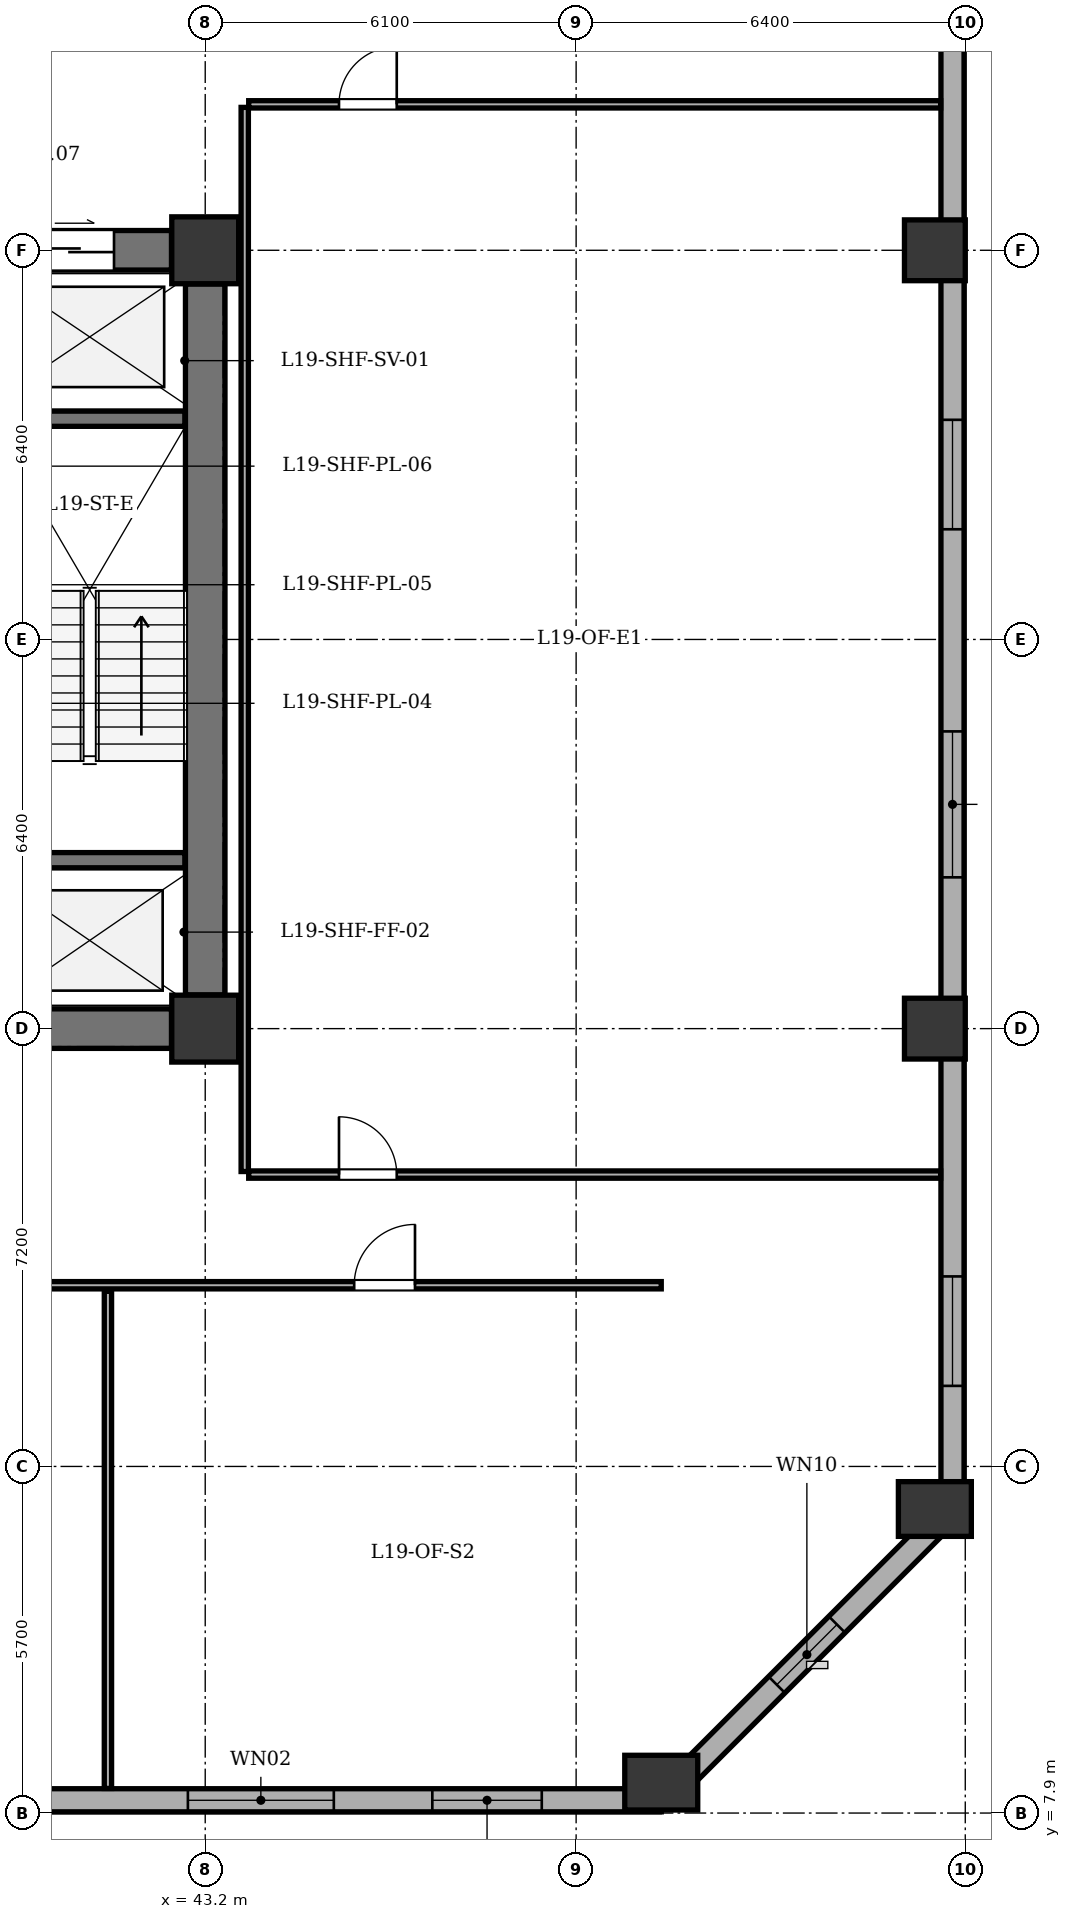
"""IFC4 building model, lengths in metres.
Left out: names, types, materials, properties, quantities, classifications, styles, units other than length and angle.
Written with IfcOpenShell. Run it as: python <this file> out.ifc"""

import sys

from ifc_helpers import new_model, si_unit, direction, frame, frame_2d, origin, origin_2d, place, context, subcontext, project, spatial, rectangle, extrude, element, fill, save


model = new_model("IFC4")
c1 = context("Model", 3, precision=1e-05, world=origin(), true_north=direction((0.0, 1.0)))
c2 = subcontext(c1, "Body", "Model", "MODEL_VIEW")
j1 = project(units=[si_unit("LENGTHUNIT", "METRE"), si_unit("PLANEANGLEUNIT", "RADIAN")], contexts=[c1])
p1 = place(None, origin())
s1 = spatial("IfcSite", under=j1, at=p1, CompositionType="ELEMENT")
p2 = place(p1, origin())
s2 = spatial("IfcBuilding", under=s1, at=p2, CompositionType="ELEMENT")
p3 = place(p2, frame((0.0, 0.0, 78.9)))
s3 = spatial("IfcBuildingStorey", under=s2, at=p3, CompositionType="ELEMENT", Elevation=78.9)
for number, where, z_axis, x_axis in (
    (1, (43.2, 20.8, 0.0), (0.0, 0.0, 1.0), (1.0, 0.0, 0.0)),
    (2, (43.2, 33.6, 0.0), (0.0, 0.0, 1.0), (1.0, 0.0, 0.0)),
):
    element("IfcColumn", number, at=place(p3, frame(where, z_axis=z_axis, x_axis=x_axis)), inside=s3, PredefinedType="COLUMN", context=c2, shape_type="SweptSolid", body=[
        extrude(rectangle(XDim=1.1, YDim=1.1, at=origin_2d()), origin(), (0.0, 0.0, 1.0), 3.9),
    ])
for number, where, z_axis, x_axis in (
    (3, (50.7, 8.4, 0.0), (0.0, 0.0, 1.0), (1.0, 0.0, 0.0)),
    (4, (55.2, 12.9, 0.0), (0.0, 0.0, 1.0), (1.0, 0.0, 0.0)),
):
    element("IfcColumn", number, at=place(p3, frame(where, z_axis=z_axis, x_axis=x_axis)), inside=s3, PredefinedType="COLUMN", context=c2, shape_type="SweptSolid", body=[
        extrude(rectangle(XDim=0.9, YDim=1.2, at=origin_2d()), origin(), (0.0, 0.0, 1.0), 3.9),
    ])
for number, where, z_axis, x_axis in (
    (5, (55.2, 20.8, 0.0), (0.0, 0.0, 1.0), (1.0, 0.0, 0.0)),
    (6, (55.2, 33.6, 0.0), (0.0, 0.0, 1.0), (1.0, 0.0, 0.0)),
):
    element("IfcColumn", number, at=place(p3, frame(where, z_axis=z_axis, x_axis=x_axis)), inside=s3, PredefinedType="COLUMN", context=c2, shape_type="SweptSolid", body=[
        extrude(rectangle(XDim=1.0, YDim=1.0, at=origin_2d()), origin(), (0.0, 0.0, 1.0), 3.9),
    ])
p4 = place(p3, frame((50.7, 8.11, 0.0), z_axis=(0.0, 0.0, 1.0), x_axis=(-1.0, 0.0, 0.0)))
e7 = element("IfcWall", 7, at=p4, inside=s3, PredefinedType="STANDARD", context=c2, shape_type="SweptSolid", body=[
    extrude(rectangle(XDim=35.0, YDim=0.38, at=frame_2d((17.5, 0.0))), origin(), (0.0, 0.0, 1.0), 3.135),
])
p5 = place(p4, frame((26.0, 0.0, 0.0)))
e8 = element("IfcOpeningElement", 8, at=p5, cuts=e7, PredefinedType="OPENING", context=c2, shape_type="SweptSolid", body=[
    extrude(rectangle(XDim=1.0, YDim=2.02, at=frame_2d((0.5, 1.01))), frame((0.0, 0.2, 0.0), z_axis=(0.0, -1.0, 0.0), x_axis=(1.0, 0.0, 0.0)), (0.0, 0.0, 1.0), 0.4),
])
p6 = place(p4, frame((1.965, 0.0, 0.8)))
e9 = element("IfcOpeningElement", 9, at=p6, cuts=e7, PredefinedType="OPENING", context=c2, shape_type="SweptSolid", body=[
    extrude(rectangle(XDim=1.8, YDim=1.9, at=frame_2d((0.9, 0.95))), frame((0.0, 0.2, 0.0), z_axis=(0.0, -1.0, 0.0), x_axis=(1.0, 0.0, 0.0)), (0.0, 0.0, 1.0), 0.4),
])
p7 = place(p4, frame((5.385, 0.0, 0.8)))
e10 = element("IfcOpeningElement", 10, at=p7, cuts=e7, PredefinedType="OPENING", context=c2, shape_type="SweptSolid", body=[
    extrude(rectangle(XDim=2.4, YDim=1.9, at=frame_2d((1.2, 0.95))), frame((0.0, 0.2, 0.0), z_axis=(0.0, -1.0, 0.0), x_axis=(1.0, 0.0, 0.0)), (0.0, 0.0, 1.0), 0.4),
])
p8 = place(p4, frame((11.275, 0.0, 0.8)))
e11 = element("IfcOpeningElement", 11, at=p8, cuts=e7, PredefinedType="OPENING", context=c2, shape_type="SweptSolid", body=[
    extrude(rectangle(XDim=1.8, YDim=1.9, at=frame_2d((0.9, 0.95))), frame((0.0, 0.2, 0.0), z_axis=(0.0, -1.0, 0.0), x_axis=(1.0, 0.0, 0.0)), (0.0, 0.0, 1.0), 0.4),
])
p9 = place(p4, frame((16.832, 0.0, 0.8)))
e12 = element("IfcOpeningElement", 12, at=p9, cuts=e7, PredefinedType="OPENING", context=c2, shape_type="SweptSolid", body=[
    extrude(rectangle(XDim=1.8, YDim=1.9, at=frame_2d((0.9, 0.95))), frame((0.0, 0.2, 0.0), z_axis=(0.0, -1.0, 0.0), x_axis=(1.0, 0.0, 0.0)), (0.0, 0.0, 1.0), 0.4),
])
p10 = place(p4, frame((19.568, 0.0, 0.8)))
e13 = element("IfcOpeningElement", 13, at=p10, cuts=e7, PredefinedType="OPENING", context=c2, shape_type="SweptSolid", body=[
    extrude(rectangle(XDim=1.8, YDim=1.9, at=frame_2d((0.9, 0.95))), frame((0.0, 0.2, 0.0), z_axis=(0.0, -1.0, 0.0), x_axis=(1.0, 0.0, 0.0)), (0.0, 0.0, 1.0), 0.4),
])
p11 = place(p4, frame((31.5, 0.0, 0.8)))
e14 = element("IfcOpeningElement", 14, at=p11, cuts=e7, PredefinedType="OPENING", context=c2, shape_type="SweptSolid", body=[
    extrude(rectangle(XDim=1.8, YDim=1.9, at=frame_2d((0.9, 0.95))), frame((0.0, 0.2, 0.0), z_axis=(0.0, -1.0, 0.0), x_axis=(1.0, 0.0, 0.0)), (0.0, 0.0, 1.0), 0.4),
])
p12 = place(p3, frame((55.49, 47.9, 0.0), z_axis=(0.0, 0.0, 1.0), x_axis=(0.0, -1.0, 0.0)))
e15 = element("IfcWall", 15, at=p12, inside=s3, PredefinedType="STANDARD", context=c2, shape_type="SweptSolid", body=[
    extrude(rectangle(XDim=35.0, YDim=0.38, at=frame_2d((17.5, 0.0))), origin(), (0.0, 0.0, 1.0), 3.135),
])
p13 = place(p12, frame((2.693, 0.0, 0.8)))
e16 = element("IfcOpeningElement", 16, at=p13, cuts=e15, PredefinedType="OPENING", context=c2, shape_type="SweptSolid", body=[
    extrude(rectangle(XDim=1.8, YDim=1.9, at=frame_2d((0.9, 0.95))), frame((0.0, 0.2, 0.0), z_axis=(0.0, -1.0, 0.0), x_axis=(1.0, 0.0, 0.0)), (0.0, 0.0, 1.0), 0.4),
])
p14 = place(p12, frame((7.457, 0.0, 0.8)))
e17 = element("IfcOpeningElement", 17, at=p14, cuts=e15, PredefinedType="OPENING", context=c2, shape_type="SweptSolid", body=[
    extrude(rectangle(XDim=2.4, YDim=1.9, at=frame_2d((1.2, 0.95))), frame((0.0, 0.2, 0.0), z_axis=(0.0, -1.0, 0.0), x_axis=(1.0, 0.0, 0.0)), (0.0, 0.0, 1.0), 0.4),
])
p15 = place(p12, frame((17.088, 0.0, 0.8)))
e18 = element("IfcOpeningElement", 18, at=p15, cuts=e15, PredefinedType="OPENING", context=c2, shape_type="SweptSolid", body=[
    extrude(rectangle(XDim=1.8, YDim=1.9, at=frame_2d((0.9, 0.95))), frame((0.0, 0.2, 0.0), z_axis=(0.0, -1.0, 0.0), x_axis=(1.0, 0.0, 0.0)), (0.0, 0.0, 1.0), 0.4),
])
p16 = place(p12, frame((22.212, 0.0, 0.8)))
e19 = element("IfcOpeningElement", 19, at=p16, cuts=e15, PredefinedType="OPENING", context=c2, shape_type="SweptSolid", body=[
    extrude(rectangle(XDim=2.4, YDim=1.9, at=frame_2d((1.2, 0.95))), frame((0.0, 0.2, 0.0), z_axis=(0.0, -1.0, 0.0), x_axis=(1.0, 0.0, 0.0)), (0.0, 0.0, 1.0), 0.4),
])
p17 = place(p12, frame((31.175, 0.0, 0.8)))
e20 = element("IfcOpeningElement", 20, at=p17, cuts=e15, PredefinedType="OPENING", context=c2, shape_type="SweptSolid", body=[
    extrude(rectangle(XDim=1.8, YDim=1.9, at=frame_2d((0.9, 0.95))), frame((0.0, 0.2, 0.0), z_axis=(0.0, -1.0, 0.0), x_axis=(1.0, 0.0, 0.0)), (0.0, 0.0, 1.0), 0.4),
])
p18 = place(p3, frame((55.49, 12.9, 0.0), z_axis=(0.0, 0.0, 1.0), x_axis=(-0.707124801467, -0.707088760447, 0.0)))
e21 = element("IfcWall", 21, at=p18, inside=s3, PredefinedType="STANDARD", context=c2, shape_type="SweptSolid", body=[
    extrude(rectangle(XDim=6.774, YDim=0.38, at=frame_2d((3.387, 0.0))), origin(), (0.0, 0.0, 1.0), 3.135),
])
p19 = place(p18, frame((2.687, 0.0, 0.8)))
e22 = element("IfcOpeningElement", 22, at=p19, cuts=e21, PredefinedType="OPENING", context=c2, shape_type="SweptSolid", body=[
    extrude(rectangle(XDim=1.4, YDim=1.65, at=frame_2d((0.7, 0.825))), frame((0.0, 0.2, 0.0), z_axis=(0.0, -1.0, 0.0), x_axis=(1.0, 0.0, 0.0)), (0.0, 0.0, 1.0), 0.4),
])
p20 = place(p3, frame((43.2, 21.355, 0.0), z_axis=(0.0, 0.0, 1.0), x_axis=(0.0, 1.0, 0.0)))
e23 = element("IfcWall", 23, at=p20, inside=s3, PredefinedType="SHEAR", context=c2, shape_type="SweptSolid", body=[
    extrude(rectangle(XDim=11.69, YDim=0.65, at=frame_2d((5.845, 0.0))), origin(), (0.0, 0.0, 1.0), 3.6),
])
p21 = place(p3, frame((35.755, 20.8, 0.0), z_axis=(0.0, 0.0, 1.0), x_axis=(1.0, 0.0, 0.0)))
e24 = element("IfcWall", 24, at=p21, inside=s3, PredefinedType="SHEAR", context=c2, shape_type="SweptSolid", body=[
    extrude(rectangle(XDim=6.89, YDim=0.65, at=frame_2d((3.445, 0.0))), origin(), (0.0, 0.0, 1.0), 3.6),
])
p22 = place(p3, frame((35.755, 33.6, 0.0), z_axis=(0.0, 0.0, 1.0), x_axis=(1.0, 0.0, 0.0)))
e25 = element("IfcWall", 25, at=p22, inside=s3, PredefinedType="SHEAR", context=c2, shape_type="SweptSolid", body=[
    extrude(rectangle(XDim=6.89, YDim=0.65, at=frame_2d((3.445, 0.0))), origin(), (0.0, 0.0, 1.0), 3.6),
])
p23 = place(p22, frame((4.645, 0.0, 0.0)))
e26 = element("IfcOpeningElement", 26, at=p23, cuts=e25, PredefinedType="OPENING", context=c2, shape_type="SweptSolid", body=[
    extrude(rectangle(XDim=1.3, YDim=2.15, at=frame_2d((0.65, 1.075))), frame((0.0, 0.335, 0.0), z_axis=(0.0, -1.0, 0.0), x_axis=(1.0, 0.0, 0.0)), (0.0, 0.0, 1.0), 0.67),
])
p24 = place(p22, frame((2.445, 0.0, 0.0)))
e27 = element("IfcOpeningElement", 27, at=p24, cuts=e25, PredefinedType="OPENING", context=c2, shape_type="SweptSolid", body=[
    extrude(rectangle(XDim=0.85, YDim=2.02, at=frame_2d((0.425, 1.01))), frame((0.0, 0.335, 0.0), z_axis=(0.0, -1.0, 0.0), x_axis=(1.0, 0.0, 0.0)), (0.0, 0.0, 1.0), 0.67),
])
for number, where, z_axis, x_axis in (
    (28, (39.69, 23.57, 0.0), (0.0, 0.0, 1.0), (1.0, 0.0, 0.0)),
    (29, (39.69, 30.83, 0.0), (0.0, 0.0, 1.0), (1.0, 0.0, 0.0)),
):
    element("IfcWall", number, at=place(p3, frame(where, z_axis=z_axis, x_axis=x_axis)), inside=s3, PredefinedType="SHEAR", context=c2, shape_type="SweptSolid", body=[
        extrude(rectangle(XDim=3.175, YDim=0.25, at=frame_2d((1.587, 0.0))), origin(), (0.0, 0.0, 1.0), 3.6),
    ])
p25 = place(p3, frame((15.7, 16.58, 0.0), z_axis=(0.0, 0.0, 1.0), x_axis=(1.0, 0.0, 0.0)))
e30 = element("IfcWall", 30, at=p25, inside=s3, PredefinedType="PARTITIONING", context=c2, shape_type="SweptSolid", body=[
    extrude(rectangle(XDim=35.0, YDim=0.12, at=frame_2d((17.5, 0.0))), origin(), (0.0, 0.0, 1.0), 3.6),
])
p26 = place(p25, frame((12.45, 0.0, 0.0)))
e31 = element("IfcOpeningElement", 31, at=p26, cuts=e30, PredefinedType="OPENING", context=c2, shape_type="SweptSolid", body=[
    extrude(rectangle(XDim=1.0, YDim=2.1, at=frame_2d((0.5, 1.05))), frame((0.0, 0.07, 0.0), z_axis=(0.0, -1.0, 0.0), x_axis=(1.0, 0.0, 0.0)), (0.0, 0.0, 1.0), 0.14),
])
p27 = place(p25, frame((29.95, 0.0, 0.0)))
e32 = element("IfcOpeningElement", 32, at=p27, cuts=e30, PredefinedType="OPENING", context=c2, shape_type="SweptSolid", body=[
    extrude(rectangle(XDim=1.0, YDim=2.1, at=frame_2d((0.5, 1.05))), frame((0.0, 0.07, 0.0), z_axis=(0.0, -1.0, 0.0), x_axis=(1.0, 0.0, 0.0)), (0.0, 0.0, 1.0), 0.14),
])
p28 = place(p3, frame((41.6, 8.305, 0.0), z_axis=(0.0, 0.0, 1.0), x_axis=(0.0, 1.0, 0.0)))
e33 = element("IfcWall", 33, at=p28, inside=s3, PredefinedType="PARTITIONING", context=c2, shape_type="SweptSolid", body=[
    extrude(rectangle(XDim=8.175, YDim=0.12, at=frame_2d((4.087, 0.0))), origin(), (0.0, 0.0, 1.0), 3.6),
])
p29 = place(p3, frame((43.85, 18.45, 0.0), z_axis=(0.0, 0.0, 1.0), x_axis=(0.0, 1.0, 0.0)))
e34 = element("IfcWall", 34, at=p29, inside=s3, PredefinedType="PARTITIONING", context=c2, shape_type="SweptSolid", body=[
    extrude(rectangle(XDim=17.5, YDim=0.12, at=frame_2d((8.75, 0.0))), origin(), (0.0, 0.0, 1.0), 3.6),
])
p30 = place(p3, frame((43.915, 18.4, 0.0), z_axis=(0.0, 0.0, 1.0), x_axis=(1.0, 0.0, 0.0)))
e35 = element("IfcWall", 35, at=p30, inside=s3, PredefinedType="PARTITIONING", context=c2, shape_type="SweptSolid", body=[
    extrude(rectangle(XDim=11.38, YDim=0.12, at=frame_2d((5.69, 0.0))), origin(), (0.0, 0.0, 1.0), 3.6),
])
p31 = place(p30, frame((1.485, 0.0, 0.0)))
e36 = element("IfcOpeningElement", 36, at=p31, cuts=e35, PredefinedType="OPENING", context=c2, shape_type="SweptSolid", body=[
    extrude(rectangle(XDim=0.95, YDim=2.1, at=frame_2d((0.475, 1.05))), frame((0.0, 0.07, 0.0), z_axis=(0.0, -1.0, 0.0), x_axis=(1.0, 0.0, 0.0)), (0.0, 0.0, 1.0), 0.14),
])
p32 = place(p3, frame((43.915, 36.0, 0.0), z_axis=(0.0, 0.0, 1.0), x_axis=(1.0, 0.0, 0.0)))
e37 = element("IfcWall", 37, at=p32, inside=s3, PredefinedType="PARTITIONING", context=c2, shape_type="SweptSolid", body=[
    extrude(rectangle(XDim=11.38, YDim=0.12, at=frame_2d((5.69, 0.0))), origin(), (0.0, 0.0, 1.0), 3.6),
])
p33 = place(p32, frame((1.485, 0.0, 0.0)))
e38 = element("IfcOpeningElement", 38, at=p33, cuts=e37, PredefinedType="OPENING", context=c2, shape_type="SweptSolid", body=[
    extrude(rectangle(XDim=0.95, YDim=2.1, at=frame_2d((0.475, 1.05))), frame((0.0, 0.07, 0.0), z_axis=(0.0, -1.0, 0.0), x_axis=(1.0, 0.0, 0.0)), (0.0, 0.0, 1.0), 0.14),
])
p34 = place(p6, origin())
e39 = element("IfcWindow", 39, at=p34, inside=s3, PartitioningType="SINGLE_PANEL", PredefinedType="WINDOW", context=c2, shape_type="SweptSolid", body=[
    extrude(rectangle(XDim=1.8, YDim=1.9, at=frame_2d((0.9, 0.95))), frame((0.0, -0.01, 0.0), z_axis=(0.0, -1.0, 0.0), x_axis=(1.0, 0.0, 0.0)), (0.0, 0.0, 1.0), 0.06),
])
fill(e9, e39)
p35 = place(p7, origin())
e40 = element("IfcWindow", 40, at=p35, inside=s3, PartitioningType="SINGLE_PANEL", PredefinedType="WINDOW", context=c2, shape_type="SweptSolid", body=[
    extrude(rectangle(XDim=2.4, YDim=1.9, at=frame_2d((1.2, 0.95))), frame((0.0, -0.01, 0.0), z_axis=(0.0, -1.0, 0.0), x_axis=(1.0, 0.0, 0.0)), (0.0, 0.0, 1.0), 0.06),
])
fill(e10, e40)
p36 = place(p15, origin())
e41 = element("IfcWindow", 41, at=p36, inside=s3, PartitioningType="SINGLE_PANEL", PredefinedType="WINDOW", context=c2, shape_type="SweptSolid", body=[
    extrude(rectangle(XDim=1.8, YDim=1.9, at=frame_2d((0.9, 0.95))), frame((0.0, -0.01, 0.0), z_axis=(0.0, -1.0, 0.0), x_axis=(1.0, 0.0, 0.0)), (0.0, 0.0, 1.0), 0.06),
])
fill(e18, e41)
p37 = place(p16, origin())
e42 = element("IfcWindow", 42, at=p37, inside=s3, PartitioningType="SINGLE_PANEL", PredefinedType="WINDOW", context=c2, shape_type="SweptSolid", body=[
    extrude(rectangle(XDim=2.4, YDim=1.9, at=frame_2d((1.2, 0.95))), frame((0.0, -0.01, 0.0), z_axis=(0.0, -1.0, 0.0), x_axis=(1.0, 0.0, 0.0)), (0.0, 0.0, 1.0), 0.06),
])
fill(e19, e42)
p38 = place(p17, origin())
e43 = element("IfcWindow", 43, at=p38, inside=s3, PartitioningType="SINGLE_PANEL", PredefinedType="WINDOW", context=c2, shape_type="SweptSolid", body=[
    extrude(rectangle(XDim=1.8, YDim=1.9, at=frame_2d((0.9, 0.95))), frame((0.0, -0.01, 0.0), z_axis=(0.0, -1.0, 0.0), x_axis=(1.0, 0.0, 0.0)), (0.0, 0.0, 1.0), 0.06),
])
fill(e20, e43)
p39 = place(p19, origin())
e44 = element("IfcWindow", 44, at=p39, inside=s3, PartitioningType="SINGLE_PANEL", PredefinedType="WINDOW", context=c2, shape_type="SweptSolid", body=[
    extrude(rectangle(XDim=1.4, YDim=1.65, at=frame_2d((0.7, 0.825))), frame((0.0, -0.01, 0.0), z_axis=(0.0, -1.0, 0.0), x_axis=(1.0, 0.0, 0.0)), (0.0, 0.0, 1.0), 0.06),
])
fill(e22, e44)
p40 = place(p23, origin())
e45 = element("IfcDoor", 45, at=p40, inside=s3, OperationType="DOUBLE_DOOR_SLIDING", PredefinedType="DOOR", context=c2, shape_type="SweptSolid", body=[
    extrude(rectangle(XDim=1.3, YDim=2.15, at=frame_2d((0.65, 1.075))), frame((0.0, 0.025, 0.0), z_axis=(0.0, -1.0, 0.0), x_axis=(1.0, 0.0, 0.0)), (0.0, 0.0, 1.0), 0.05),
])
fill(e26, e45)
p41 = place(p27, origin())
e46 = element("IfcDoor", 46, at=p41, inside=s3, OperationType="SINGLE_SWING_RIGHT", PredefinedType="DOOR", context=c2, shape_type="SweptSolid", body=[
    extrude(rectangle(XDim=1.0, YDim=2.1, at=frame_2d((0.5, 1.05))), frame((0.0, 0.025, 0.0), z_axis=(0.0, -1.0, 0.0), x_axis=(1.0, 0.0, 0.0)), (0.0, 0.0, 1.0), 0.05),
])
fill(e32, e46)
p42 = place(p31, origin())
e47 = element("IfcDoor", 47, at=p42, inside=s3, OperationType="SINGLE_SWING_LEFT", PredefinedType="DOOR", context=c2, shape_type="SweptSolid", body=[
    extrude(rectangle(XDim=0.95, YDim=2.1, at=frame_2d((0.475, 1.05))), frame((0.0, 0.025, 0.0), z_axis=(0.0, -1.0, 0.0), x_axis=(1.0, 0.0, 0.0)), (0.0, 0.0, 1.0), 0.05),
])
fill(e36, e47)
p43 = place(p33, origin())
e48 = element("IfcDoor", 48, at=p43, inside=s3, OperationType="SINGLE_SWING_RIGHT", PredefinedType="DOOR", context=c2, shape_type="SweptSolid", body=[
    extrude(rectangle(XDim=0.95, YDim=2.1, at=frame_2d((0.475, 1.05))), frame((0.0, 0.025, 0.0), z_axis=(0.0, -1.0, 0.0), x_axis=(1.0, 0.0, 0.0)), (0.0, 0.0, 1.0), 0.05),
])
fill(e38, e48)
save(model, sys.argv[1])
